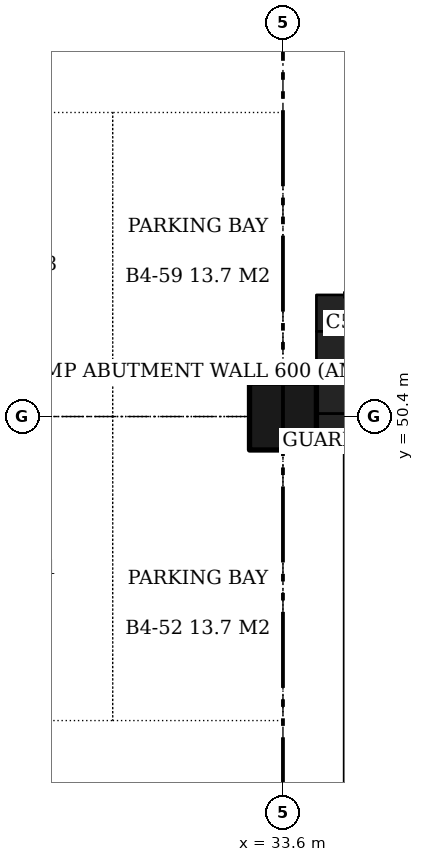
"""IFC4 building model, lengths in metres.
Left out: names, types, materials, properties, quantities, classifications, styles, units other than length and angle.
Written with IfcOpenShell. Run it as: python <this file> out.ifc"""

import sys

from ifc_helpers import new_model, si_unit, direction, frame, frame_2d, origin, origin_2d, place, context, subcontext, project, spatial, rectangle, extrude, element, save


model = new_model("IFC4")
c1 = context("Model", 3, precision=1e-05, world=origin(), true_north=direction((0.0, 1.0)))
c2 = subcontext(c1, "Body", "Model", "MODEL_VIEW")
j1 = project(units=[si_unit("LENGTHUNIT", "METRE"), si_unit("PLANEANGLEUNIT", "RADIAN")], contexts=[c1])
p1 = place(None, origin())
s1 = spatial("IfcSite", under=j1, at=p1, CompositionType="ELEMENT")
p2 = place(p1, origin())
s2 = spatial("IfcBuilding", under=s1, at=p2, CompositionType="ELEMENT")
p3 = place(p2, frame((0.0, 0.0, -16.0)))
s3 = spatial("IfcBuildingStorey", under=s2, at=p3, CompositionType="ELEMENT", Elevation=-16.0)
p4 = place(p3, frame((33.6, 50.4, 0.0), z_axis=(0.0, 0.0, 1.0), x_axis=(1.0, 0.0, 0.0)))
e1 = element("IfcColumn", 1, at=p4, inside=s3, PredefinedType="COLUMN", context=c2, shape_type="SweptSolid", body=[
    extrude(rectangle(XDim=1.1, YDim=1.1, at=origin_2d()), origin(), (0.0, 0.0, 1.0), 3.7),
])
for number, where, z_axis, x_axis in (
    (2, (34.15, 50.15, 0.0), (0.0, 0.0, 1.0), (1.0, 0.0, 0.0)),
    (3, (34.15, 52.1, 0.0), (0.0, 0.0, 1.0), (1.0, 0.0, 0.0)),
):
    element("IfcWall", number, at=place(p3, frame(where, z_axis=z_axis, x_axis=x_axis)), inside=s3, PredefinedType="SOLIDWALL", context=c2, shape_type="SweptSolid", body=[
        extrude(rectangle(XDim=7.3, YDim=0.6, at=frame_2d((3.65, 0.0))), origin(), (0.0, 0.0, 1.0), 3.52),
    ])
p5 = place(p3, frame((34.45, 50.45, 0.0), z_axis=(0.0, 0.0, 1.0), x_axis=(0.0, 1.0, 0.0)))
e4 = element("IfcWall", 4, at=p5, inside=s3, PredefinedType="SOLIDWALL", context=c2, shape_type="SweptSolid", body=[
    extrude(rectangle(XDim=1.35, YDim=0.6, at=frame_2d((0.675, 0.0))), origin(), (0.0, 0.0, 1.0), 3.52),
])
save(model, sys.argv[1])
